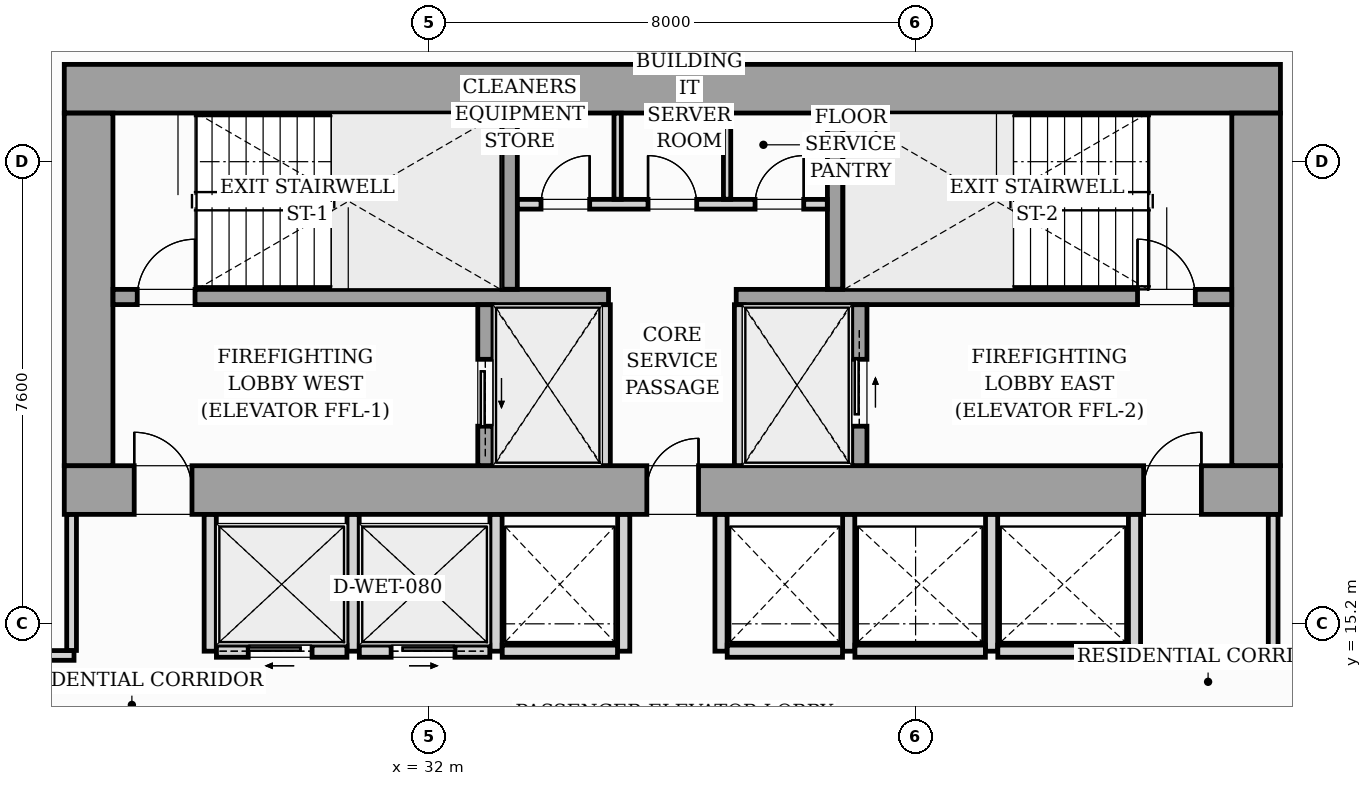
"""IFC4 building model, lengths in metres.
Left out: names, types, materials, properties, quantities, classifications, styles, units other than length and angle.
Written with IfcOpenShell. Run it as: python <this file> out.ifc"""

import sys

from ifc_helpers import new_model, si_unit, direction, frame, frame_2d, origin, origin_2d, place, context, subcontext, project, spatial, rectangle, i_section, extrude, source, transform, mapped, element, fill, save


model = new_model("IFC4")
c1 = context("Model", 3, precision=1e-05, world=origin(), true_north=direction((0.0, 1.0)))
c2 = subcontext(c1, "Body", "Model", "MODEL_VIEW")
j1 = project(units=[si_unit("LENGTHUNIT", "METRE"), si_unit("PLANEANGLEUNIT", "RADIAN")], contexts=[c1])
p1 = place(None, origin())
s1 = spatial("IfcSite", under=j1, at=p1, CompositionType="ELEMENT")
p2 = place(p1, origin())
s2 = spatial("IfcBuilding", under=s1, at=p2, CompositionType="ELEMENT")
p3 = place(p2, frame((0.0, 0.0, 42.2)))
s3 = spatial("IfcBuildingStorey", under=s2, at=p3, CompositionType="ELEMENT", Elevation=42.2)
m1 = source(origin(), c2, "Body", "SweptSolid", [
    extrude(i_section(OverallWidth=0.437, OverallDepth=0.514, WebThickness=0.061, FlangeThickness=0.097, FilletRadius=0.018, at=origin_2d()), origin(), (0.0, 0.0, 1.0), 3.196),
])
for number, where, z_axis, x_axis in (
    (1, (26.4, 17.4, 0.002), (0.0, 0.0, 1.0), (1.0, 0.0, 0.0)),
    (2, (33.12, 17.4, 0.002), (0.0, 0.0, 1.0), (1.0, 0.0, 0.0)),
    (3, (38.88, 17.4, 0.002), (0.0, 0.0, 1.0), (1.0, 0.0, 0.0)),
    (4, (45.6, 17.4, 0.002), (0.0, 0.0, 1.0), (1.0, 0.0, 0.0)),
    (5, (26.4, 24.0, 0.002), (0.0, 0.0, 1.0), (1.0, 0.0, 0.0)),
    (6, (33.12, 24.0, 0.002), (0.0, 0.0, 1.0), (1.0, 0.0, 0.0)),
    (7, (38.88, 24.0, 0.002), (0.0, 0.0, 1.0), (1.0, 0.0, 0.0)),
    (8, (45.6, 24.0, 0.002), (0.0, 0.0, 1.0), (1.0, 0.0, 0.0)),
):
    element("IfcColumn", number, at=place(p3, frame(where, z_axis=z_axis, x_axis=x_axis)), inside=s3, PredefinedType="PILASTER", context=c2, shape_type="MappedRepresentation", body=[
        mapped(m1, transform((0.0, 0.0, 0.0), scale=1.0)),
    ])
p4 = place(p3, frame((26.0, 17.4, 0.0), z_axis=(0.0, 0.0, 1.0), x_axis=(1.0, 0.0, 0.0)))
e9 = element("IfcWall", 9, at=p4, inside=s3, PredefinedType="SHEAR", context=c2, shape_type="SweptSolid", body=[
    extrude(rectangle(XDim=20.0, YDim=0.8, at=frame_2d((10.0, 0.0))), origin(), (0.0, 0.0, 1.0), 3.2),
])
p5 = place(p4, frame((1.15, 0.0, 0.0)))
e10 = element("IfcOpeningElement", 10, at=p5, cuts=e9, PredefinedType="OPENING", context=c2, shape_type="SweptSolid", body=[
    extrude(rectangle(XDim=0.95, YDim=2.06, at=frame_2d((0.475, 1.03))), frame((0.0, 0.41, 0.0), z_axis=(0.0, -1.0, 0.0), x_axis=(1.0, 0.0, 0.0)), (0.0, 0.0, 1.0), 0.82),
])
p6 = place(p4, frame((9.58, 0.0, 0.0)))
e11 = element("IfcOpeningElement", 11, at=p6, cuts=e9, PredefinedType="OPENING", context=c2, shape_type="SweptSolid", body=[
    extrude(rectangle(XDim=0.85, YDim=2.0, at=frame_2d((0.425, 1.0))), frame((0.0, 0.41, 0.0), z_axis=(0.0, -1.0, 0.0), x_axis=(1.0, 0.0, 0.0)), (0.0, 0.0, 1.0), 0.82),
])
p7 = place(p4, frame((17.75, 0.0, 0.0)))
e12 = element("IfcOpeningElement", 12, at=p7, cuts=e9, PredefinedType="OPENING", context=c2, shape_type="SweptSolid", body=[
    extrude(rectangle(XDim=0.95, YDim=2.06, at=frame_2d((0.475, 1.03))), frame((0.0, 0.41, 0.0), z_axis=(0.0, -1.0, 0.0), x_axis=(1.0, 0.0, 0.0)), (0.0, 0.0, 1.0), 0.82),
])
p8 = place(p3, frame((26.0, 24.0, 0.0), z_axis=(0.0, 0.0, 1.0), x_axis=(1.0, 0.0, 0.0)))
e13 = element("IfcWall", 13, at=p8, inside=s3, PredefinedType="SHEAR", context=c2, shape_type="SweptSolid", body=[
    extrude(rectangle(XDim=20.0, YDim=0.8, at=frame_2d((10.0, 0.0))), origin(), (0.0, 0.0, 1.0), 3.2),
])
for number, where, z_axis, x_axis in (
    (14, (26.4, 17.802, 0.0), (0.0, 0.0, 1.0), (0.0, 1.0, 0.0)),
    (15, (45.6, 17.802, 0.0), (0.0, 0.0, 1.0), (0.0, 1.0, 0.0)),
):
    element("IfcWall", number, at=place(p3, frame(where, z_axis=z_axis, x_axis=x_axis)), inside=s3, PredefinedType="SHEAR", context=c2, shape_type="SweptSolid", body=[
        extrude(rectangle(XDim=5.796, YDim=0.8, at=frame_2d((2.898, 0.0))), origin(), (0.0, 0.0, 1.0), 3.2),
    ])
p9 = place(p3, frame((26.802, 20.575, 0.0), z_axis=(0.0, 0.0, 1.0), x_axis=(1.0, 0.0, 0.0)))
e16 = element("IfcWall", 16, at=p9, inside=s3, PredefinedType="SOLIDWALL", context=c2, shape_type="SweptSolid", body=[
    extrude(rectangle(XDim=8.148, YDim=0.25, at=frame_2d((4.074, 0.0))), origin(), (0.0, 0.0, 1.0), 3.2),
])
p10 = place(p9, frame((0.398, 0.0, 0.0)))
e17 = element("IfcOpeningElement", 17, at=p10, cuts=e16, PredefinedType="OPENING", context=c2, shape_type="SweptSolid", body=[
    extrude(rectangle(XDim=0.95, YDim=2.06, at=frame_2d((0.475, 1.03))), frame((0.0, 0.135, 0.0), z_axis=(0.0, -1.0, 0.0), x_axis=(1.0, 0.0, 0.0)), (0.0, 0.0, 1.0), 0.27),
])
p11 = place(p3, frame((37.05, 20.575, 0.0), z_axis=(0.0, 0.0, 1.0), x_axis=(1.0, 0.0, 0.0)))
e18 = element("IfcWall", 18, at=p11, inside=s3, PredefinedType="SOLIDWALL", context=c2, shape_type="SweptSolid", body=[
    extrude(rectangle(XDim=8.148, YDim=0.25, at=frame_2d((4.074, 0.0))), origin(), (0.0, 0.0, 1.0), 3.2),
])
p12 = place(p11, frame((6.6, 0.0, 0.0)))
e19 = element("IfcOpeningElement", 19, at=p12, cuts=e18, PredefinedType="OPENING", context=c2, shape_type="SweptSolid", body=[
    extrude(rectangle(XDim=0.95, YDim=2.06, at=frame_2d((0.475, 1.03))), frame((0.0, 0.135, 0.0), z_axis=(0.0, -1.0, 0.0), x_axis=(1.0, 0.0, 0.0)), (0.0, 0.0, 1.0), 0.27),
])
for number, where, z_axis, x_axis in (
    (20, (33.325, 20.702, 0.0), (0.0, 0.0, 1.0), (0.0, 1.0, 0.0)),
    (21, (38.675, 20.702, 0.0), (0.0, 0.0, 1.0), (0.0, 1.0, 0.0)),
):
    element("IfcWall", number, at=place(p3, frame(where, z_axis=z_axis, x_axis=x_axis)), inside=s3, PredefinedType="SOLIDWALL", context=c2, shape_type="SweptSolid", body=[
        extrude(rectangle(XDim=2.896, YDim=0.25, at=frame_2d((1.448, 0.0))), origin(), (0.0, 0.0, 1.0), 3.2),
    ])
p13 = place(p3, frame((32.925, 17.802, 0.0), z_axis=(0.0, 0.0, 1.0), x_axis=(0.0, 1.0, 0.0)))
e22 = element("IfcWall", 22, at=p13, inside=s3, PredefinedType="SOLIDWALL", context=c2, shape_type="SweptSolid", body=[
    extrude(rectangle(XDim=2.646, YDim=0.25, at=frame_2d((1.323, 0.0))), origin(), (0.0, 0.0, 1.0), 3.2),
])
p14 = place(p13, frame((0.648, 0.0, 0.0)))
e23 = element("IfcOpeningElement", 23, at=p14, cuts=e22, PredefinedType="OPENING", context=c2, shape_type="SweptSolid", body=[
    extrude(rectangle(XDim=1.1, YDim=2.08, at=frame_2d((0.55, 1.04))), frame((0.0, 0.135, 0.0), z_axis=(0.0, -1.0, 0.0), x_axis=(1.0, 0.0, 0.0)), (0.0, 0.0, 1.0), 0.27),
])
for number, where, z_axis, x_axis in (
    (24, (34.9, 17.802, 0.0), (0.0, 0.0, 1.0), (0.0, 1.0, 0.0)),
    (25, (37.1, 17.802, 0.0), (0.0, 0.0, 1.0), (0.0, 1.0, 0.0)),
):
    element("IfcWall", number, at=place(p3, frame(where, z_axis=z_axis, x_axis=x_axis)), inside=s3, PredefinedType="PARTITIONING", context=c2, shape_type="SweptSolid", body=[
        extrude(rectangle(XDim=2.646, YDim=0.16, at=frame_2d((1.323, 0.0))), origin(), (0.0, 0.0, 1.0), 2.94),
    ])
p15 = place(p3, frame((39.075, 17.802, 0.0), z_axis=(0.0, 0.0, 1.0), x_axis=(0.0, 1.0, 0.0)))
e26 = element("IfcWall", 26, at=p15, inside=s3, PredefinedType="SOLIDWALL", context=c2, shape_type="SweptSolid", body=[
    extrude(rectangle(XDim=2.646, YDim=0.25, at=frame_2d((1.323, 0.0))), origin(), (0.0, 0.0, 1.0), 3.2),
])
p16 = place(p15, frame((0.648, 0.0, 0.0)))
e27 = element("IfcOpeningElement", 27, at=p16, cuts=e26, PredefinedType="OPENING", context=c2, shape_type="SweptSolid", body=[
    extrude(rectangle(XDim=1.1, YDim=2.08, at=frame_2d((0.55, 1.04))), frame((0.0, 0.135, 0.0), z_axis=(0.0, -1.0, 0.0), x_axis=(1.0, 0.0, 0.0)), (0.0, 0.0, 1.0), 0.27),
])
p17 = place(p3, frame((33.452, 22.1, 0.0), z_axis=(0.0, 0.0, 1.0), x_axis=(1.0, 0.0, 0.0)))
e28 = element("IfcWall", 28, at=p17, inside=s3, PredefinedType="PARTITIONING", context=c2, shape_type="SweptSolid", body=[
    extrude(rectangle(XDim=5.096, YDim=0.16, at=frame_2d((2.548, 0.0))), origin(), (0.0, 0.0, 1.0), 2.94),
])
p18 = place(p17, frame((0.388, 0.0, 0.0)))
e29 = element("IfcOpeningElement", 29, at=p18, cuts=e28, PredefinedType="OPENING", context=c2, shape_type="SweptSolid", body=[
    extrude(rectangle(XDim=0.8, YDim=2.05, at=frame_2d((0.4, 1.025))), frame((0.0, 0.09, 0.0), z_axis=(0.0, -1.0, 0.0), x_axis=(1.0, 0.0, 0.0)), (0.0, 0.0, 1.0), 0.18),
])
p19 = place(p17, frame((2.148, 0.0, 0.0)))
e30 = element("IfcOpeningElement", 30, at=p19, cuts=e28, PredefinedType="OPENING", context=c2, shape_type="SweptSolid", body=[
    extrude(rectangle(XDim=0.8, YDim=2.05, at=frame_2d((0.4, 1.025))), frame((0.0, 0.09, 0.0), z_axis=(0.0, -1.0, 0.0), x_axis=(1.0, 0.0, 0.0)), (0.0, 0.0, 1.0), 0.18),
])
p20 = place(p17, frame((3.908, 0.0, 0.0)))
e31 = element("IfcOpeningElement", 31, at=p20, cuts=e28, PredefinedType="OPENING", context=c2, shape_type="SweptSolid", body=[
    extrude(rectangle(XDim=0.8, YDim=2.05, at=frame_2d((0.4, 1.025))), frame((0.0, 0.09, 0.0), z_axis=(0.0, -1.0, 0.0), x_axis=(1.0, 0.0, 0.0)), (0.0, 0.0, 1.0), 0.18),
])
for number, where, z_axis, x_axis in (
    (32, (35.1, 22.182, 0.0), (0.0, 0.0, 1.0), (0.0, 1.0, 0.0)),
    (33, (36.9, 22.182, 0.0), (0.0, 0.0, 1.0), (0.0, 1.0, 0.0)),
):
    element("IfcWall", number, at=place(p3, frame(where, z_axis=z_axis, x_axis=x_axis)), inside=s3, PredefinedType="PARTITIONING", context=c2, shape_type="SweptSolid", body=[
        extrude(rectangle(XDim=1.416, YDim=0.12, at=frame_2d((0.708, 0.0))), origin(), (0.0, 0.0, 1.0), 2.94),
    ])
for number, where, z_axis, x_axis in (
    (34, (28.4, 14.75, 0.0), (0.0, 0.0, 1.0), (0.0, 1.0, 0.0)),
    (35, (30.75, 14.75, 0.0), (0.0, 0.0, 1.0), (0.0, 1.0, 0.0)),
    (36, (33.1, 14.75, 0.0), (0.0, 0.0, 1.0), (0.0, 1.0, 0.0)),
):
    element("IfcWall", number, at=place(p3, frame(where, z_axis=z_axis, x_axis=x_axis)), inside=s3, PredefinedType="PARTITIONING", context=c2, shape_type="SweptSolid", body=[
        extrude(rectangle(XDim=2.248, YDim=0.2, at=frame_2d((1.124, 0.0))), origin(), (0.0, 0.0, 1.0), 2.94),
    ])
p21 = place(p3, frame((28.502, 14.75, 0.0), z_axis=(0.0, 0.0, 1.0), x_axis=(1.0, 0.0, 0.0)))
e37 = element("IfcWall", 37, at=p21, inside=s3, PredefinedType="PARTITIONING", context=c2, shape_type="SweptSolid", body=[
    extrude(rectangle(XDim=2.146, YDim=0.2, at=frame_2d((1.073, 0.0))), origin(), (0.0, 0.0, 1.0), 2.94),
])
p22 = place(p21, frame((0.523, 0.0, 0.0)))
e38 = element("IfcOpeningElement", 38, at=p22, cuts=e37, PredefinedType="OPENING", context=c2, shape_type="SweptSolid", body=[
    extrude(rectangle(XDim=1.05, YDim=2.08, at=frame_2d((0.525, 1.04))), frame((0.0, 0.11, 0.0), z_axis=(0.0, -1.0, 0.0), x_axis=(1.0, 0.0, 0.0)), (0.0, 0.0, 1.0), 0.22),
])
p23 = place(p3, frame((30.852, 14.75, 0.0), z_axis=(0.0, 0.0, 1.0), x_axis=(1.0, 0.0, 0.0)))
e39 = element("IfcWall", 39, at=p23, inside=s3, PredefinedType="PARTITIONING", context=c2, shape_type="SweptSolid", body=[
    extrude(rectangle(XDim=2.146, YDim=0.2, at=frame_2d((1.073, 0.0))), origin(), (0.0, 0.0, 1.0), 2.94),
])
p24 = place(p23, frame((0.523, 0.0, 0.0)))
e40 = element("IfcOpeningElement", 40, at=p24, cuts=e39, PredefinedType="OPENING", context=c2, shape_type="SweptSolid", body=[
    extrude(rectangle(XDim=1.05, YDim=2.08, at=frame_2d((0.525, 1.04))), frame((0.0, 0.11, 0.0), z_axis=(0.0, -1.0, 0.0), x_axis=(1.0, 0.0, 0.0)), (0.0, 0.0, 1.0), 0.22),
])
p25 = place(p3, frame((35.2, 14.75, 0.0), z_axis=(0.0, 0.0, 1.0), x_axis=(0.0, 1.0, 0.0)))
e41 = element("IfcWall", 41, at=p25, inside=s3, PredefinedType="PARTITIONING", context=c2, shape_type="SweptSolid", body=[
    extrude(rectangle(XDim=2.248, YDim=0.2, at=frame_2d((1.124, 0.0))), origin(), (0.0, 0.0, 1.0), 2.94),
])
p26 = place(p3, frame((33.202, 14.75, 0.0), z_axis=(0.0, 0.0, 1.0), x_axis=(1.0, 0.0, 0.0)))
e42 = element("IfcWall", 42, at=p26, inside=s3, PredefinedType="PARTITIONING", context=c2, shape_type="SweptSolid", body=[
    extrude(rectangle(XDim=1.896, YDim=0.2, at=frame_2d((0.948, 0.0))), origin(), (0.0, 0.0, 1.0), 2.94),
])
for number, where, z_axis, x_axis in (
    (43, (36.8, 14.75, 0.0), (0.0, 0.0, 1.0), (0.0, 1.0, 0.0)),
    (44, (38.9, 14.75, 0.0), (0.0, 0.0, 1.0), (0.0, 1.0, 0.0)),
):
    element("IfcWall", number, at=place(p3, frame(where, z_axis=z_axis, x_axis=x_axis)), inside=s3, PredefinedType="PARTITIONING", context=c2, shape_type="SweptSolid", body=[
        extrude(rectangle(XDim=2.248, YDim=0.2, at=frame_2d((1.124, 0.0))), origin(), (0.0, 0.0, 1.0), 2.94),
    ])
p27 = place(p3, frame((36.902, 14.75, 0.0), z_axis=(0.0, 0.0, 1.0), x_axis=(1.0, 0.0, 0.0)))
e45 = element("IfcWall", 45, at=p27, inside=s3, PredefinedType="PARTITIONING", context=c2, shape_type="SweptSolid", body=[
    extrude(rectangle(XDim=1.896, YDim=0.2, at=frame_2d((0.948, 0.0))), origin(), (0.0, 0.0, 1.0), 2.94),
])
for number, where, z_axis, x_axis in (
    (46, (41.25, 14.75, 0.0), (0.0, 0.0, 1.0), (0.0, 1.0, 0.0)),
    (47, (43.6, 14.75, 0.0), (0.0, 0.0, 1.0), (0.0, 1.0, 0.0)),
):
    element("IfcWall", number, at=place(p3, frame(where, z_axis=z_axis, x_axis=x_axis)), inside=s3, PredefinedType="PARTITIONING", context=c2, shape_type="SweptSolid", body=[
        extrude(rectangle(XDim=2.248, YDim=0.2, at=frame_2d((1.124, 0.0))), origin(), (0.0, 0.0, 1.0), 2.94),
    ])
for number, where, z_axis, x_axis in (
    (48, (39.002, 14.75, 0.0), (0.0, 0.0, 1.0), (1.0, 0.0, 0.0)),
    (49, (41.352, 14.75, 0.0), (0.0, 0.0, 1.0), (1.0, 0.0, 0.0)),
):
    element("IfcWall", number, at=place(p3, frame(where, z_axis=z_axis, x_axis=x_axis)), inside=s3, PredefinedType="PARTITIONING", context=c2, shape_type="SweptSolid", body=[
        extrude(rectangle(XDim=2.146, YDim=0.2, at=frame_2d((1.073, 0.0))), origin(), (0.0, 0.0, 1.0), 2.94),
    ])
p28 = place(p3, frame((36.0, 24.402, 0.0), z_axis=(0.0, 0.0, 1.0), x_axis=(0.0, 1.0, 0.0)))
e50 = element("IfcWall", 50, at=p28, inside=s3, PredefinedType="PARTITIONING", context=c2, shape_type="SweptSolid", body=[
    extrude(rectangle(XDim=3.218, YDim=0.2, at=frame_2d((1.609, 0.0))), origin(), (0.0, 0.0, 1.0), 2.94),
])
p29 = place(p3, frame((15.282, 14.68, 0.0), z_axis=(0.0, 0.0, 1.0), x_axis=(1.0, 0.0, 0.0)))
e51 = element("IfcWall", 51, at=p29, inside=s3, PredefinedType="PARTITIONING", context=c2, shape_type="SweptSolid", body=[
    extrude(rectangle(XDim=10.878, YDim=0.16, at=frame_2d((5.439, 0.0))), origin(), (0.0, 0.0, 1.0), 2.94),
])
p30 = place(p29, frame((4.863, 0.0, 0.0)))
e52 = element("IfcOpeningElement", 52, at=p30, cuts=e51, PredefinedType="OPENING", context=c2, shape_type="SweptSolid", body=[
    extrude(rectangle(XDim=0.95, YDim=2.06, at=frame_2d((0.475, 1.03))), frame((0.0, 0.09, 0.0), z_axis=(0.0, -1.0, 0.0), x_axis=(1.0, 0.0, 0.0)), (0.0, 0.0, 1.0), 0.18),
])
p31 = place(p3, frame((26.12, 14.762, 0.0), z_axis=(0.0, 0.0, 1.0), x_axis=(0.0, 1.0, 0.0)))
e53 = element("IfcWall", 53, at=p31, inside=s3, PredefinedType="PARTITIONING", context=c2, shape_type="SweptSolid", body=[
    extrude(rectangle(XDim=2.236, YDim=0.16, at=frame_2d((1.118, 0.0))), origin(), (0.0, 0.0, 1.0), 2.94),
])
p32 = place(p3, frame((45.84, 14.68, 0.0), z_axis=(0.0, 0.0, 1.0), x_axis=(1.0, 0.0, 0.0)))
e54 = element("IfcWall", 54, at=p32, inside=s3, PredefinedType="PARTITIONING", context=c2, shape_type="SweptSolid", body=[
    extrude(rectangle(XDim=4.428, YDim=0.16, at=frame_2d((2.214, 0.0))), origin(), (0.0, 0.0, 1.0), 2.94),
])
p33 = place(p32, frame((1.84, 0.0, 0.0)))
e55 = element("IfcOpeningElement", 55, at=p33, cuts=e54, PredefinedType="OPENING", context=c2, shape_type="SweptSolid", body=[
    extrude(rectangle(XDim=0.95, YDim=2.06, at=frame_2d((0.475, 1.03))), frame((0.0, 0.09, 0.0), z_axis=(0.0, -1.0, 0.0), x_axis=(1.0, 0.0, 0.0)), (0.0, 0.0, 1.0), 0.18),
])
p34 = place(p3, frame((45.88, 14.762, 0.0), z_axis=(0.0, 0.0, 1.0), x_axis=(0.0, 1.0, 0.0)))
e56 = element("IfcWall", 56, at=p34, inside=s3, PredefinedType="PARTITIONING", context=c2, shape_type="SweptSolid", body=[
    extrude(rectangle(XDim=2.236, YDim=0.16, at=frame_2d((1.118, 0.0))), origin(), (0.0, 0.0, 1.0), 2.94),
])
m2 = source(origin(), c2, "Body", "SweptSolid", [
    extrude(rectangle(XDim=0.95, YDim=2.06, at=frame_2d((0.475, 1.03))), frame((0.0, 0.025, 0.0), z_axis=(0.0, -1.0, 0.0), x_axis=(1.0, 0.0, 0.0)), (0.0, 0.0, 1.0), 0.05),
])
p35 = place(p5, origin())
e57 = element("IfcDoor", 57, at=p35, inside=s3, OperationType="SINGLE_SWING_LEFT", PredefinedType="DOOR", context=c2, shape_type="MappedRepresentation", body=[
    mapped(m2, transform((0.0, 0.0, 0.0), scale=1.0)),
])
fill(e10, e57)
m3 = source(origin(), c2, "Body", "SweptSolid", [
    extrude(rectangle(XDim=0.85, YDim=2.0, at=frame_2d((0.425, 1.0))), frame((0.0, 0.025, 0.0), z_axis=(0.0, -1.0, 0.0), x_axis=(1.0, 0.0, 0.0)), (0.0, 0.0, 1.0), 0.05),
])
p36 = place(p6, origin())
e58 = element("IfcDoor", 58, at=p36, inside=s3, OperationType="SINGLE_SWING_RIGHT", PredefinedType="DOOR", context=c2, shape_type="MappedRepresentation", body=[
    mapped(m3, transform((0.0, 0.0, 0.0), scale=1.0)),
])
fill(e11, e58)
p37 = place(p7, origin())
e59 = element("IfcDoor", 59, at=p37, inside=s3, OperationType="SINGLE_SWING_RIGHT", PredefinedType="DOOR", context=c2, shape_type="MappedRepresentation", body=[
    mapped(m2, transform((0.0, 0.0, 0.0), scale=1.0)),
])
fill(e12, e59)
p38 = place(p10, origin())
e60 = element("IfcDoor", 60, at=p38, inside=s3, OperationType="SINGLE_SWING_RIGHT", PredefinedType="DOOR", context=c2, shape_type="MappedRepresentation", body=[
    mapped(m2, transform((0.0, 0.0, 0.0), scale=1.0)),
])
fill(e17, e60)
p39 = place(p12, origin())
e61 = element("IfcDoor", 61, at=p39, inside=s3, OperationType="SINGLE_SWING_LEFT", PredefinedType="DOOR", context=c2, shape_type="MappedRepresentation", body=[
    mapped(m2, transform((0.0, 0.0, 0.0), scale=1.0)),
])
fill(e19, e61)
m4 = source(origin(), c2, "Body", "SweptSolid", [
    extrude(rectangle(XDim=1.1, YDim=2.08, at=frame_2d((0.55, 1.04))), frame((0.0, 0.025, 0.0), z_axis=(0.0, -1.0, 0.0), x_axis=(1.0, 0.0, 0.0)), (0.0, 0.0, 1.0), 0.05),
])
p40 = place(p14, origin())
e62 = element("IfcDoor", 62, at=p40, inside=s3, OperationType="SLIDING_TO_LEFT", PredefinedType="DOOR", context=c2, shape_type="MappedRepresentation", body=[
    mapped(m4, transform((0.0, 0.0, 0.0), scale=1.0)),
])
fill(e23, e62)
p41 = place(p16, origin())
e63 = element("IfcDoor", 63, at=p41, inside=s3, OperationType="SLIDING_TO_RIGHT", PredefinedType="DOOR", context=c2, shape_type="MappedRepresentation", body=[
    mapped(m4, transform((0.0, 0.0, 0.0), scale=1.0)),
])
fill(e27, e63)
m5 = source(origin(), c2, "Body", "SweptSolid", [
    extrude(rectangle(XDim=0.8, YDim=2.05, at=frame_2d((0.4, 1.025))), frame((0.0, 0.025, 0.0), z_axis=(0.0, -1.0, 0.0), x_axis=(1.0, 0.0, 0.0)), (0.0, 0.0, 1.0), 0.05),
])
p42 = place(p18, origin())
e64 = element("IfcDoor", 64, at=p42, inside=s3, OperationType="SINGLE_SWING_RIGHT", PredefinedType="DOOR", context=c2, shape_type="MappedRepresentation", body=[
    mapped(m5, transform((0.0, 0.0, 0.0), scale=1.0)),
])
fill(e29, e64)
p43 = place(p19, origin())
e65 = element("IfcDoor", 65, at=p43, inside=s3, OperationType="SINGLE_SWING_LEFT", PredefinedType="DOOR", context=c2, shape_type="MappedRepresentation", body=[
    mapped(m5, transform((0.0, 0.0, 0.0), scale=1.0)),
])
fill(e30, e65)
p44 = place(p20, origin())
e66 = element("IfcDoor", 66, at=p44, inside=s3, OperationType="SINGLE_SWING_RIGHT", PredefinedType="DOOR", context=c2, shape_type="MappedRepresentation", body=[
    mapped(m5, transform((0.0, 0.0, 0.0), scale=1.0)),
])
fill(e31, e66)
m6 = source(origin(), c2, "Body", "SweptSolid", [
    extrude(rectangle(XDim=1.05, YDim=2.08, at=frame_2d((0.525, 1.04))), frame((0.0, 0.025, 0.0), z_axis=(0.0, -1.0, 0.0), x_axis=(1.0, 0.0, 0.0)), (0.0, 0.0, 1.0), 0.05),
])
p45 = place(p22, origin())
e67 = element("IfcDoor", 67, at=p45, inside=s3, OperationType="SLIDING_TO_LEFT", PredefinedType="DOOR", context=c2, shape_type="MappedRepresentation", body=[
    mapped(m6, transform((0.0, 0.0, 0.0), scale=1.0)),
])
fill(e38, e67)
p46 = place(p24, origin())
e68 = element("IfcDoor", 68, at=p46, inside=s3, OperationType="SLIDING_TO_RIGHT", PredefinedType="DOOR", context=c2, shape_type="MappedRepresentation", body=[
    mapped(m6, transform((0.0, 0.0, 0.0), scale=1.0)),
])
fill(e40, e68)
save(model, sys.argv[1])
